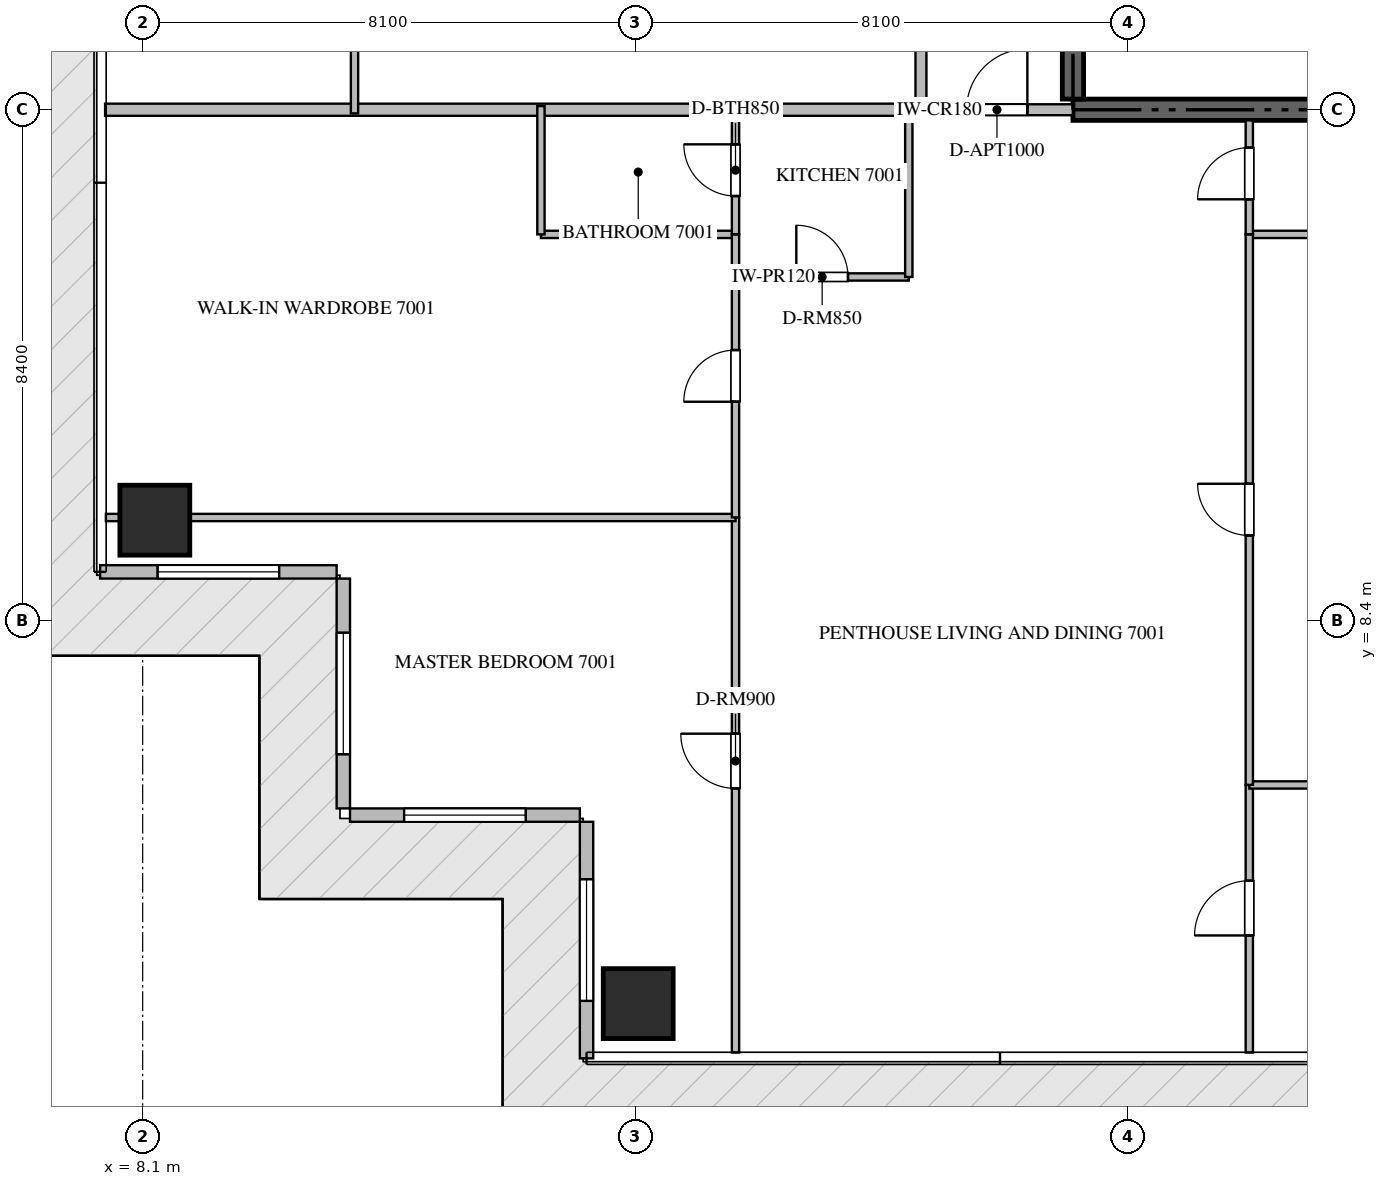
"""IFC4 building model, lengths in metres.
Left out: names, types, materials, properties, quantities, classifications, styles, units other than length and angle.
Written with IfcOpenShell. Run it as: python <this file> out.ifc"""

import sys

from ifc_helpers import new_model, si_unit, direction, frame, frame_2d, origin, origin_2d, place, context, subcontext, project, spatial, rectangle, extrude, source, transform, mapped, element, fill, save


model = new_model("IFC4")
c1 = context("Model", 3, precision=1e-05, world=origin(), true_north=direction((0.0, 1.0)))
c2 = subcontext(c1, "Body", "Model", "MODEL_VIEW")
j1 = project(units=[si_unit("LENGTHUNIT", "METRE"), si_unit("PLANEANGLEUNIT", "RADIAN")], contexts=[c1])
p1 = place(None, origin())
s1 = spatial("IfcSite", under=j1, at=p1, CompositionType="ELEMENT")
p2 = place(p1, origin())
s2 = spatial("IfcBuilding", under=s1, at=p2, CompositionType="ELEMENT")
p3 = place(p2, frame((0.0, 0.0, 279.75)))
s3 = spatial("IfcBuildingStorey", under=s2, at=p3, CompositionType="ELEMENT", Elevation=279.75)
p4 = place(p3, frame((23.4, 16.8, -0.26), z_axis=(0.0, 0.0, 1.0), x_axis=(1.0, 0.0, 0.0)))
e1 = element("IfcWall", 1, at=p4, inside=s3, PredefinedType="SHEAR", context=c2, shape_type="SweptSolid", body=[
    extrude(rectangle(XDim=18.0, YDim=0.35, at=frame_2d((9.0, 0.0))), origin(), (0.0, 0.0, 1.0), 3.848),
])
p5 = place(p3, frame((23.4, 16.975, -0.26), z_axis=(0.0, 0.0, 1.0), x_axis=(0.0, 1.0, 0.0)))
e2 = element("IfcWall", 2, at=p5, inside=s3, PredefinedType="SHEAR", context=c2, shape_type="SweptSolid", body=[
    extrude(rectangle(XDim=4.875, YDim=0.35, at=frame_2d((2.438, 0.0))), origin(), (0.0, 0.0, 1.0), 3.848),
])
m1 = source(origin(), c2, "Body", "SweptSolid", [
    extrude(rectangle(XDim=1.15, YDim=1.15, at=origin_2d()), origin(), (0.0, 0.0, 1.0), 3.85),
])
for number, where, z_axis, x_axis in (
    (3, (16.25, 2.1, -0.26), (0.0, 0.0, 1.0), (1.0, 0.0, 0.0)),
    (4, (8.3, 10.05, -0.26), (0.0, 0.0, 1.0), (1.0, 0.0, 0.0)),
):
    element("IfcColumn", number, at=place(p3, frame(where, z_axis=z_axis, x_axis=x_axis)), inside=s3, PredefinedType="COLUMN", context=c2, shape_type="MappedRepresentation", body=[
        mapped(m1, transform((0.0, 0.0, 0.0), scale=1.0)),
    ])
p6 = place(p3, frame((7.4, 9.2, 0.0), z_axis=(0.0, 0.0, 1.0), x_axis=(1.0, 0.0, 0.0)))
e5 = element("IfcWall", 5, at=p6, inside=s3, PredefinedType="ELEMENTEDWALL", context=c2, shape_type="SweptSolid", body=[
    extrude(rectangle(XDim=3.89, YDim=0.22, at=frame_2d((1.945, 0.0))), origin(), (0.0, 0.0, 1.0), 3.575),
])
p7 = place(p6, frame((0.945, 0.0, 0.65)))
e6 = element("IfcOpeningElement", 6, at=p7, cuts=e5, PredefinedType="OPENING", context=c2, shape_type="SweptSolid", body=[
    extrude(rectangle(XDim=2.0, YDim=2.2, at=frame_2d((1.0, 1.1))), frame((0.0, 0.12, 0.0), z_axis=(0.0, -1.0, 0.0), x_axis=(1.0, 0.0, 0.0)), (0.0, 0.0, 1.0), 0.24),
])
p8 = place(p3, frame((11.4, 9.09, 0.0), z_axis=(0.0, 0.0, 1.0), x_axis=(0.0, -1.0, 0.0)))
e7 = element("IfcWall", 7, at=p8, inside=s3, PredefinedType="ELEMENTEDWALL", context=c2, shape_type="SweptSolid", body=[
    extrude(rectangle(XDim=3.78, YDim=0.22, at=frame_2d((1.89, 0.0))), origin(), (0.0, 0.0, 1.0), 3.575),
])
p9 = place(p8, frame((0.89, 0.0, 0.65)))
e8 = element("IfcOpeningElement", 8, at=p9, cuts=e7, PredefinedType="OPENING", context=c2, shape_type="SweptSolid", body=[
    extrude(rectangle(XDim=2.0, YDim=2.2, at=frame_2d((1.0, 1.1))), frame((0.0, 0.12, 0.0), z_axis=(0.0, -1.0, 0.0), x_axis=(1.0, 0.0, 0.0)), (0.0, 0.0, 1.0), 0.24),
])
p10 = place(p3, frame((11.51, 5.2, 0.0), z_axis=(0.0, 0.0, 1.0), x_axis=(1.0, 0.0, 0.0)))
e9 = element("IfcWall", 9, at=p10, inside=s3, PredefinedType="ELEMENTEDWALL", context=c2, shape_type="SweptSolid", body=[
    extrude(rectangle(XDim=3.78, YDim=0.22, at=frame_2d((1.89, 0.0))), origin(), (0.0, 0.0, 1.0), 3.575),
])
p11 = place(p10, frame((0.89, 0.0, 0.65)))
e10 = element("IfcOpeningElement", 10, at=p11, cuts=e9, PredefinedType="OPENING", context=c2, shape_type="SweptSolid", body=[
    extrude(rectangle(XDim=2.0, YDim=2.2, at=frame_2d((1.0, 1.1))), frame((0.0, 0.12, 0.0), z_axis=(0.0, -1.0, 0.0), x_axis=(1.0, 0.0, 0.0)), (0.0, 0.0, 1.0), 0.24),
])
p12 = place(p3, frame((15.4, 5.09, 0.0), z_axis=(0.0, 0.0, 1.0), x_axis=(0.0, -1.0, 0.0)))
e11 = element("IfcWall", 11, at=p12, inside=s3, PredefinedType="ELEMENTEDWALL", context=c2, shape_type="SweptSolid", body=[
    extrude(rectangle(XDim=3.89, YDim=0.22, at=frame_2d((1.945, 0.0))), origin(), (0.0, 0.0, 1.0), 3.575),
])
p13 = place(p12, frame((0.945, 0.0, 0.65)))
e12 = element("IfcOpeningElement", 12, at=p13, cuts=e11, PredefinedType="OPENING", context=c2, shape_type="SweptSolid", body=[
    extrude(rectangle(XDim=2.0, YDim=2.2, at=frame_2d((1.0, 1.1))), frame((0.0, 0.12, 0.0), z_axis=(0.0, -1.0, 0.0), x_axis=(1.0, 0.0, 0.0)), (0.0, 0.0, 1.0), 0.24),
])
p14 = place(p3, frame((7.482, 16.8, 0.0), z_axis=(0.0, 0.0, 1.0), x_axis=(1.0, 0.0, 0.0)))
e13 = element("IfcWall", 13, at=p14, inside=s3, PredefinedType="PARTITIONING", context=c2, shape_type="SweptSolid", body=[
    extrude(rectangle(XDim=13.418, YDim=0.2, at=frame_2d((6.709, 0.0))), origin(), (0.0, 0.0, 1.0), 3.59),
])
p15 = place(p3, frame((20.902, 16.8, 0.0), z_axis=(0.0, 0.0, 1.0), x_axis=(1.0, 0.0, 0.0)))
e14 = element("IfcWall", 14, at=p15, inside=s3, PredefinedType="PARTITIONING", context=c2, shape_type="SweptSolid", body=[
    extrude(rectangle(XDim=2.496, YDim=0.18, at=frame_2d((1.248, 0.0))), origin(), (0.0, 0.0, 1.0), 3.59),
])
p16 = place(p15, frame((0.748, 0.0, 0.0)))
e15 = element("IfcOpeningElement", 15, at=p16, cuts=e14, PredefinedType="OPENING", context=c2, shape_type="SweptSolid", body=[
    extrude(rectangle(XDim=1.0, YDim=2.15, at=frame_2d((0.5, 1.075))), frame((0.0, 0.1, 0.0), z_axis=(0.0, -1.0, 0.0), x_axis=(1.0, 0.0, 0.0)), (0.0, 0.0, 1.0), 0.2),
])
p17 = place(p3, frame((20.9, 16.8, 0.0), z_axis=(0.0, 0.0, 1.0), x_axis=(0.0, 1.0, 0.0)))
e16 = element("IfcWall", 16, at=p17, inside=s3, PredefinedType="PARTITIONING", context=c2, shape_type="SweptSolid", body=[
    extrude(rectangle(XDim=16.8, YDim=0.18, at=frame_2d((8.4, 0.0))), origin(), (0.0, 0.0, 1.0), 3.59),
])
p18 = place(p17, frame((14.5, 0.0, 0.0)))
e17 = element("IfcOpeningElement", 17, at=p18, cuts=e16, PredefinedType="OPENING", context=c2, shape_type="SweptSolid", body=[
    extrude(rectangle(XDim=1.0, YDim=2.15, at=frame_2d((0.5, 1.075))), frame((0.0, 0.1, 0.0), z_axis=(0.0, -1.0, 0.0), x_axis=(1.0, 0.0, 0.0)), (0.0, 0.0, 1.0), 0.2),
])
p19 = place(p3, frame((17.85, 14.05, 0.0), z_axis=(0.0, 0.0, 1.0), x_axis=(1.0, 0.0, 0.0)))
e18 = element("IfcWall", 18, at=p19, inside=s3, PredefinedType="PARTITIONING", context=c2, shape_type="SweptSolid", body=[
    extrude(rectangle(XDim=2.85, YDim=0.12, at=frame_2d((1.425, 0.0))), origin(), (0.0, 0.0, 1.0), 3.59),
])
p20 = place(p19, frame((1.0, 0.0, 0.0)))
e19 = element("IfcOpeningElement", 19, at=p20, cuts=e18, PredefinedType="OPENING", context=c2, shape_type="SweptSolid", body=[
    extrude(rectangle(XDim=0.85, YDim=2.1, at=frame_2d((0.425, 1.05))), frame((0.0, 0.07, 0.0), z_axis=(0.0, -1.0, 0.0), x_axis=(1.0, 0.0, 0.0)), (0.0, 0.0, 1.0), 0.14),
])
p21 = place(p3, frame((20.7, 14.05, 0.0), z_axis=(0.0, 0.0, 1.0), x_axis=(0.0, 1.0, 0.0)))
e20 = element("IfcWall", 20, at=p21, inside=s3, PredefinedType="PARTITIONING", context=c2, shape_type="SweptSolid", body=[
    extrude(rectangle(XDim=2.81, YDim=0.12, at=frame_2d((1.405, 0.0))), origin(), (0.0, 0.0, 1.0), 3.59),
])
p22 = place(p3, frame((17.85, 1.295, 0.0), z_axis=(0.0, 0.0, 1.0), x_axis=(0.0, 1.0, 0.0)))
e21 = element("IfcWall", 21, at=p22, inside=s3, PredefinedType="PARTITIONING", context=c2, shape_type="SweptSolid", body=[
    extrude(rectangle(XDim=8.799, YDim=0.12, at=frame_2d((4.399, 0.0))), origin(), (0.0, 0.0, 1.0), 3.59),
])
p23 = place(p22, frame((4.344, 0.0, 0.0)))
e22 = element("IfcOpeningElement", 22, at=p23, cuts=e21, PredefinedType="OPENING", context=c2, shape_type="SweptSolid", body=[
    extrude(rectangle(XDim=0.9, YDim=2.1, at=frame_2d((0.45, 1.05))), frame((0.0, 0.07, 0.0), z_axis=(0.0, -1.0, 0.0), x_axis=(1.0, 0.0, 0.0)), (0.0, 0.0, 1.0), 0.14),
])
p24 = place(p3, frame((7.495, 10.094, 0.0), z_axis=(0.0, 0.0, 1.0), x_axis=(1.0, 0.0, 0.0)))
e23 = element("IfcWall", 23, at=p24, inside=s3, PredefinedType="PARTITIONING", context=c2, shape_type="SweptSolid", body=[
    extrude(rectangle(XDim=10.355, YDim=0.12, at=frame_2d((5.177, 0.0))), origin(), (0.0, 0.0, 1.0), 3.122),
])
p25 = place(p3, frame((14.65, 14.75, 0.0), z_axis=(0.0, 0.0, 1.0), x_axis=(1.0, 0.0, 0.0)))
e24 = element("IfcWall", 24, at=p25, inside=s3, PredefinedType="PARTITIONING", context=c2, shape_type="SweptSolid", body=[
    extrude(rectangle(XDim=3.2, YDim=0.12, at=frame_2d((1.6, 0.0))), origin(), (0.0, 0.0, 1.0), 3.59),
])
p26 = place(p3, frame((14.65, 14.75, 0.0), z_axis=(0.0, 0.0, 1.0), x_axis=(0.0, 1.0, 0.0)))
e25 = element("IfcWall", 25, at=p26, inside=s3, PredefinedType="PARTITIONING", context=c2, shape_type="SweptSolid", body=[
    extrude(rectangle(XDim=2.11, YDim=0.12, at=frame_2d((1.055, 0.0))), origin(), (0.0, 0.0, 1.0), 3.59),
])
p27 = place(p3, frame((17.85, 10.096, 0.0), z_axis=(0.0, 0.0, 1.0), x_axis=(0.0, 1.0, 0.0)))
e26 = element("IfcWall", 26, at=p27, inside=s3, PredefinedType="PARTITIONING", context=c2, shape_type="SweptSolid", body=[
    extrude(rectangle(XDim=4.654, YDim=0.12, at=frame_2d((2.327, 0.0))), origin(), (0.0, 0.0, 1.0), 3.59),
])
p28 = place(p27, frame((1.902, 0.0, 0.0)))
e27 = element("IfcOpeningElement", 27, at=p28, cuts=e26, PredefinedType="OPENING", context=c2, shape_type="SweptSolid", body=[
    extrude(rectangle(XDim=0.85, YDim=2.1, at=frame_2d((0.425, 1.05))), frame((0.0, 0.07, 0.0), z_axis=(0.0, -1.0, 0.0), x_axis=(1.0, 0.0, 0.0)), (0.0, 0.0, 1.0), 0.14),
])
p29 = place(p3, frame((17.85, 14.752, 0.0), z_axis=(0.0, 0.0, 1.0), x_axis=(0.0, 1.0, 0.0)))
e28 = element("IfcWall", 28, at=p29, inside=s3, PredefinedType="PARTITIONING", context=c2, shape_type="SweptSolid", body=[
    extrude(rectangle(XDim=2.108, YDim=0.12, at=frame_2d((1.054, 0.0))), origin(), (0.0, 0.0, 1.0), 3.59),
])
p30 = place(p29, frame((0.629, 0.0, 0.0)))
e29 = element("IfcOpeningElement", 29, at=p30, cuts=e28, PredefinedType="OPENING", context=c2, shape_type="SweptSolid", body=[
    extrude(rectangle(XDim=0.85, YDim=2.1, at=frame_2d((0.425, 1.05))), frame((0.0, 0.07, 0.0), z_axis=(0.0, -1.0, 0.0), x_axis=(1.0, 0.0, 0.0)), (0.0, 0.0, 1.0), 0.14),
])
p31 = place(p3, frame((26.3, 1.295, 0.0), z_axis=(0.0, 0.0, 1.0), x_axis=(0.0, 1.0, 0.0)))
e30 = element("IfcWall", 30, at=p31, inside=s3, PredefinedType="PARTITIONING", context=c2, shape_type="SweptSolid", body=[
    extrude(rectangle(XDim=4.401, YDim=0.12, at=frame_2d((2.201, 0.0))), origin(), (0.0, 0.0, 1.0), 3.59),
])
p32 = place(p31, frame((1.926, 0.0, 0.0)))
e31 = element("IfcOpeningElement", 31, at=p32, cuts=e30, PredefinedType="OPENING", context=c2, shape_type="SweptSolid", body=[
    extrude(rectangle(XDim=0.9, YDim=2.1, at=frame_2d((0.45, 1.05))), frame((0.0, 0.07, 0.0), z_axis=(0.0, -1.0, 0.0), x_axis=(1.0, 0.0, 0.0)), (0.0, 0.0, 1.0), 0.14),
])
for number, where, z_axis, x_axis in (
    (32, (26.3, 5.696, 0.0), (0.0, 0.0, 1.0), (1.0, 0.0, 0.0)),
    (33, (26.3, 14.75, 0.0), (0.0, 0.0, 1.0), (1.0, 0.0, 0.0)),
):
    element("IfcWall", number, at=place(p3, frame(where, z_axis=z_axis, x_axis=x_axis)), inside=s3, PredefinedType="PARTITIONING", context=c2, shape_type="SweptSolid", body=[
        extrude(rectangle(XDim=6.96, YDim=0.12, at=frame_2d((3.48, 0.0))), origin(), (0.0, 0.0, 1.0), 3.59),
    ])
p33 = place(p3, frame((26.3, 5.698, 0.0), z_axis=(0.0, 0.0, 1.0), x_axis=(0.0, 1.0, 0.0)))
e34 = element("IfcWall", 34, at=p33, inside=s3, PredefinedType="PARTITIONING", context=c2, shape_type="SweptSolid", body=[
    extrude(rectangle(XDim=9.052, YDim=0.12, at=frame_2d((4.526, 0.0))), origin(), (0.0, 0.0, 1.0), 3.59),
])
p34 = place(p33, frame((4.101, 0.0, 0.0)))
e35 = element("IfcOpeningElement", 35, at=p34, cuts=e34, PredefinedType="OPENING", context=c2, shape_type="SweptSolid", body=[
    extrude(rectangle(XDim=0.85, YDim=2.1, at=frame_2d((0.425, 1.05))), frame((0.0, 0.07, 0.0), z_axis=(0.0, -1.0, 0.0), x_axis=(1.0, 0.0, 0.0)), (0.0, 0.0, 1.0), 0.14),
])
p35 = place(p3, frame((26.3, 14.752, 0.0), z_axis=(0.0, 0.0, 1.0), x_axis=(0.0, 1.0, 0.0)))
e36 = element("IfcWall", 36, at=p35, inside=s3, PredefinedType="PARTITIONING", context=c2, shape_type="SweptSolid", body=[
    extrude(rectangle(XDim=1.873, YDim=0.12, at=frame_2d((0.937, 0.0))), origin(), (0.0, 0.0, 1.0), 3.59),
])
p36 = place(p35, frame((0.575, 0.0, 0.0)))
e37 = element("IfcOpeningElement", 37, at=p36, cuts=e36, PredefinedType="OPENING", context=c2, shape_type="SweptSolid", body=[
    extrude(rectangle(XDim=0.85, YDim=2.1, at=frame_2d((0.425, 1.05))), frame((0.0, 0.07, 0.0), z_axis=(0.0, -1.0, 0.0), x_axis=(1.0, 0.0, 0.0)), (0.0, 0.0, 1.0), 0.14),
])
p37 = place(p3, frame((11.584, 16.74, 0.0), z_axis=(0.0, 0.0, 1.0), x_axis=(0.0, 1.0, 0.0)))
e38 = element("IfcWall", 38, at=p37, inside=s3, PredefinedType="PARTITIONING", context=c2, shape_type="SweptSolid", body=[
    extrude(rectangle(XDim=10.48, YDim=0.12, at=frame_2d((5.24, 0.0))), origin(), (0.0, 0.0, 1.0), 3.59),
])
m2 = source(origin(), c2, "Body", "SweptSolid", [
    extrude(rectangle(XDim=2.0, YDim=2.2, at=frame_2d((1.0, 1.1))), frame((0.0, 0.03, 0.0), z_axis=(0.0, -1.0, 0.0), x_axis=(1.0, 0.0, 0.0)), (0.0, 0.0, 1.0), 0.06),
])
p38 = place(p7, origin())
e39 = element("IfcWindow", 39, at=p38, inside=s3, PartitioningType="SINGLE_PANEL", PredefinedType="WINDOW", context=c2, shape_type="MappedRepresentation", body=[
    mapped(m2, transform((0.0, 0.0, 0.0), scale=1.0)),
])
fill(e6, e39)
p39 = place(p9, origin())
e40 = element("IfcWindow", 40, at=p39, inside=s3, PartitioningType="SINGLE_PANEL", PredefinedType="WINDOW", context=c2, shape_type="MappedRepresentation", body=[
    mapped(m2, transform((0.0, 0.0, 0.0), scale=1.0)),
])
fill(e8, e40)
p40 = place(p11, origin())
e41 = element("IfcWindow", 41, at=p40, inside=s3, PartitioningType="SINGLE_PANEL", PredefinedType="WINDOW", context=c2, shape_type="MappedRepresentation", body=[
    mapped(m2, transform((0.0, 0.0, 0.0), scale=1.0)),
])
fill(e10, e41)
p41 = place(p13, origin())
e42 = element("IfcWindow", 42, at=p41, inside=s3, PartitioningType="SINGLE_PANEL", PredefinedType="WINDOW", context=c2, shape_type="MappedRepresentation", body=[
    mapped(m2, transform((0.0, 0.0, 0.0), scale=1.0)),
])
fill(e12, e42)
m3 = source(origin(), c2, "Body", "SweptSolid", [
    extrude(rectangle(XDim=1.0, YDim=2.15, at=frame_2d((0.5, 1.075))), frame((0.0, 0.025, 0.0), z_axis=(0.0, -1.0, 0.0), x_axis=(1.0, 0.0, 0.0)), (0.0, 0.0, 1.0), 0.05),
])
p42 = place(p16, origin())
e43 = element("IfcDoor", 43, at=p42, inside=s3, OperationType="SINGLE_SWING_RIGHT", PredefinedType="DOOR", context=c2, shape_type="MappedRepresentation", body=[
    mapped(m3, transform((0.0, 0.0, 0.0), scale=1.0)),
])
fill(e15, e43)
m4 = source(origin(), c2, "Body", "SweptSolid", [
    extrude(rectangle(XDim=0.85, YDim=2.1, at=frame_2d((0.425, 1.05))), frame((0.0, 0.025, 0.0), z_axis=(0.0, -1.0, 0.0), x_axis=(1.0, 0.0, 0.0)), (0.0, 0.0, 1.0), 0.05),
])
p43 = place(p20, origin())
e44 = element("IfcDoor", 44, at=p43, inside=s3, OperationType="SINGLE_SWING_LEFT", PredefinedType="DOOR", context=c2, shape_type="MappedRepresentation", body=[
    mapped(m4, transform((0.0, 0.0, 0.0), scale=1.0)),
])
fill(e19, e44)
m5 = source(origin(), c2, "Body", "SweptSolid", [
    extrude(rectangle(XDim=0.9, YDim=2.1, at=frame_2d((0.45, 1.05))), frame((0.0, 0.025, 0.0), z_axis=(0.0, -1.0, 0.0), x_axis=(1.0, 0.0, 0.0)), (0.0, 0.0, 1.0), 0.05),
])
p44 = place(p23, origin())
e45 = element("IfcDoor", 45, at=p44, inside=s3, OperationType="SINGLE_SWING_RIGHT", PredefinedType="DOOR", context=c2, shape_type="MappedRepresentation", body=[
    mapped(m5, transform((0.0, 0.0, 0.0), scale=1.0)),
])
fill(e22, e45)
p45 = place(p28, origin())
e46 = element("IfcDoor", 46, at=p45, inside=s3, OperationType="SINGLE_SWING_LEFT", PredefinedType="DOOR", context=c2, shape_type="MappedRepresentation", body=[
    mapped(m4, transform((0.0, 0.0, 0.0), scale=1.0)),
])
fill(e27, e46)
p46 = place(p30, origin())
e47 = element("IfcDoor", 47, at=p46, inside=s3, OperationType="SINGLE_SWING_RIGHT", PredefinedType="DOOR", context=c2, shape_type="MappedRepresentation", body=[
    mapped(m4, transform((0.0, 0.0, 0.0), scale=1.0)),
])
fill(e29, e47)
p47 = place(p32, origin())
e48 = element("IfcDoor", 48, at=p47, inside=s3, OperationType="SINGLE_SWING_LEFT", PredefinedType="DOOR", context=c2, shape_type="MappedRepresentation", body=[
    mapped(m5, transform((0.0, 0.0, 0.0), scale=1.0)),
])
fill(e31, e48)
p48 = place(p34, origin())
e49 = element("IfcDoor", 49, at=p48, inside=s3, OperationType="SINGLE_SWING_RIGHT", PredefinedType="DOOR", context=c2, shape_type="MappedRepresentation", body=[
    mapped(m4, transform((0.0, 0.0, 0.0), scale=1.0)),
])
fill(e35, e49)
p49 = place(p36, origin())
e50 = element("IfcDoor", 50, at=p49, inside=s3, OperationType="SINGLE_SWING_LEFT", PredefinedType="DOOR", context=c2, shape_type="MappedRepresentation", body=[
    mapped(m4, transform((0.0, 0.0, 0.0), scale=1.0)),
])
fill(e37, e50)
save(model, sys.argv[1])
